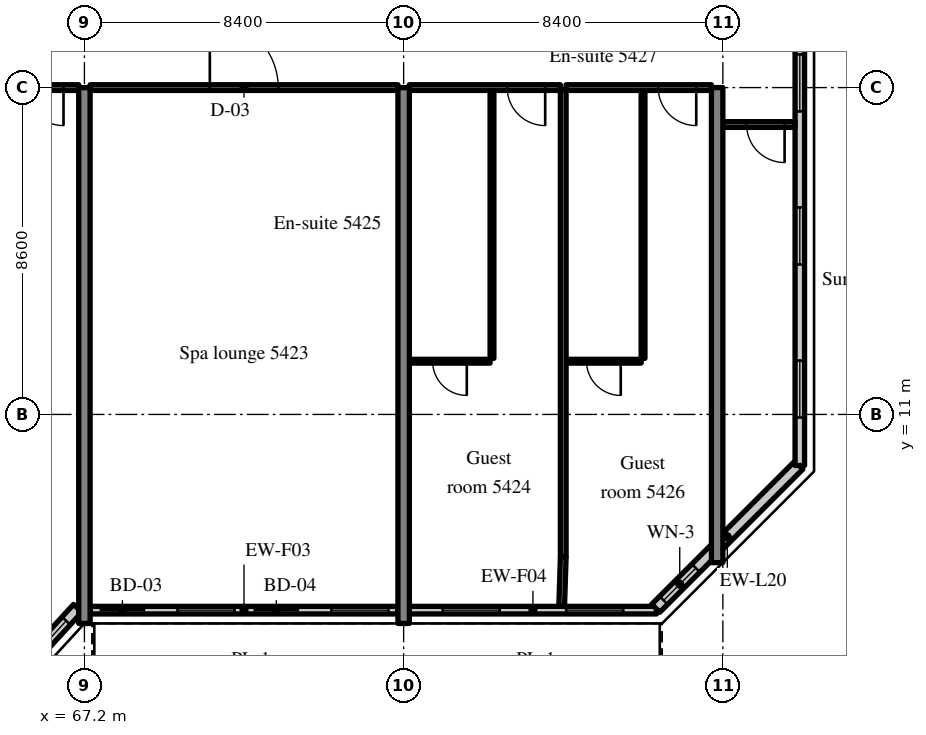
"""IFC4 building model, lengths in metres.
Left out: names, types, materials, properties, quantities, classifications, styles, units other than length and angle.
Written with IfcOpenShell. Run it as: python <this file> out.ifc"""

import sys

from ifc_helpers import new_model, si_unit, direction, frame, frame_2d, origin, place, context, subcontext, project, spatial, rectangle, extrude, source, transform, mapped, element, fill, save


model = new_model("IFC4")
c1 = context("Model", 3, precision=1e-05, world=origin(), true_north=direction((0.0, 1.0)))
c2 = subcontext(c1, "Body", "Model", "MODEL_VIEW")
j1 = project(units=[si_unit("LENGTHUNIT", "METRE"), si_unit("PLANEANGLEUNIT", "RADIAN")], contexts=[c1])
p1 = place(None, origin())
s1 = spatial("IfcSite", under=j1, at=p1, CompositionType="ELEMENT")
p2 = place(p1, origin())
s2 = spatial("IfcBuilding", under=s1, at=p2, CompositionType="ELEMENT")
p3 = place(p2, frame((0.0, 0.0, 225.7)))
s3 = spatial("IfcBuildingStorey", under=s2, at=p3, CompositionType="ELEMENT", Elevation=225.7)
m1 = source(origin(), c2, "Body", "SweptSolid", [
    extrude(rectangle(XDim=14.1, YDim=0.3, at=frame_2d((7.05, 0.0))), origin(), (0.0, 0.0, 1.0), 3.62),
])
for number, where, z_axis, x_axis in (
    (1, (67.2, 5.5, 0.0), (0.0, 0.0, 1.0), (0.0, 1.0, 0.0)),
    (2, (75.6, 5.5, 0.0), (0.0, 0.0, 1.0), (0.0, 1.0, 0.0)),
):
    element("IfcWall", number, at=place(p3, frame(where, z_axis=z_axis, x_axis=x_axis)), inside=s3, PredefinedType="SHEAR", context=c2, shape_type="MappedRepresentation", body=[
        mapped(m1, transform((0.0, 0.0, 0.0), scale=1.0)),
    ])
m2 = source(origin(), c2, "Body", "SweptSolid", [
    extrude(rectangle(XDim=12.5, YDim=0.3, at=frame_2d((6.25, 0.0))), origin(), (0.0, 0.0, 1.0), 3.62),
])
p4 = place(p3, frame((83.85, 7.1, 0.0), z_axis=(0.0, 0.0, 1.0), x_axis=(0.0, 1.0, 0.0)))
e3 = element("IfcWall", 3, at=p4, inside=s3, PredefinedType="SHEAR", context=c2, shape_type="MappedRepresentation", body=[
    mapped(m2, transform((0.0, 0.0, 0.0), scale=1.0)),
])
m3 = source(origin(), c2, "Body", "SweptSolid", [
    extrude(rectangle(XDim=2.398, YDim=0.3, at=frame_2d((1.199, 0.0))), origin(), (0.0, 0.0, 1.0), 3.62),
])
p5 = place(p3, frame((65.404, 4.131, 0.0), z_axis=(0.0, 0.0, 1.0), x_axis=(0.675374189419, 0.737475222815, 0.0)))
e4 = element("IfcWall", 4, at=p5, inside=s3, PredefinedType="SOLIDWALL", context=c2, shape_type="MappedRepresentation", body=[
    mapped(m3, transform((0.0, 0.0, 0.0), scale=1.0)),
])
m4 = source(origin(), c2, "Body", "SweptSolid", [
    extrude(rectangle(XDim=1.5, YDim=2.0, at=frame_2d((0.75, 1.0))), frame((0.0, 0.16, 0.0), z_axis=(0.0, -1.0, 0.0), x_axis=(1.0, 0.0, 0.0)), (0.0, 0.0, 1.0), 0.32),
])
p6 = place(p5, frame((0.449, 0.0, 0.9)))
e5 = element("IfcOpeningElement", 5, at=p6, cuts=e4, PredefinedType="OPENING", context=c2, shape_type="MappedRepresentation", body=[
    mapped(m4, transform((0.0, 0.0, 0.0), scale=1.0)),
])
m5 = source(origin(), c2, "Body", "SweptSolid", [
    extrude(rectangle(XDim=8.1, YDim=0.2, at=frame_2d((4.05, 0.0))), origin(), (0.0, 0.0, 1.0), 3.02),
])
p7 = place(p3, frame((67.35, 5.85, 0.0), z_axis=(0.0, 0.0, 1.0), x_axis=(1.0, 0.0, 0.0)))
e6 = element("IfcWall", 6, at=p7, inside=s3, PredefinedType="SOLIDWALL", context=c2, shape_type="MappedRepresentation", body=[
    mapped(m5, transform((0.0, 0.0, 0.0), scale=1.0)),
])
m6 = source(origin(), c2, "Body", "SweptSolid", [
    extrude(rectangle(XDim=1.2, YDim=2.4, at=frame_2d((0.6, 1.2))), frame((0.0, 0.11, 0.0), z_axis=(0.0, -1.0, 0.0), x_axis=(1.0, 0.0, 0.0)), (0.0, 0.0, 1.0), 0.22),
])
p8 = place(p7, frame((0.25, 0.0, 0.0)))
e7 = element("IfcOpeningElement", 7, at=p8, cuts=e6, PredefinedType="OPENING", context=c2, shape_type="MappedRepresentation", body=[
    mapped(m6, transform((0.0, 0.0, 0.0), scale=1.0)),
])
m7 = source(origin(), c2, "Body", "SweptSolid", [
    extrude(rectangle(XDim=1.5, YDim=1.5, at=frame_2d((0.75, 0.75))), frame((0.0, 0.11, 0.0), z_axis=(0.0, -1.0, 0.0), x_axis=(1.0, 0.0, 0.0)), (0.0, 0.0, 1.0), 0.22),
])
p9 = place(p7, frame((2.3, 0.0, 0.9)))
e8 = element("IfcOpeningElement", 8, at=p9, cuts=e6, PredefinedType="OPENING", context=c2, shape_type="MappedRepresentation", body=[
    mapped(m7, transform((0.0, 0.0, 0.0), scale=1.0)),
])
p10 = place(p7, frame((4.3, 0.0, 0.0)))
e9 = element("IfcOpeningElement", 9, at=p10, cuts=e6, PredefinedType="OPENING", context=c2, shape_type="MappedRepresentation", body=[
    mapped(m6, transform((0.0, 0.0, 0.0), scale=1.0)),
])
p11 = place(p7, frame((6.35, 0.0, 0.9)))
e10 = element("IfcOpeningElement", 10, at=p11, cuts=e6, PredefinedType="OPENING", context=c2, shape_type="MappedRepresentation", body=[
    mapped(m7, transform((0.0, 0.0, 0.0), scale=1.0)),
])
m8 = source(origin(), c2, "Body", "SweptSolid", [
    extrude(rectangle(XDim=6.505, YDim=0.2, at=frame_2d((3.252, 0.0))), origin(), (0.0, 0.0, 1.0), 3.02),
])
p12 = place(p3, frame((75.75, 5.85, 0.0), z_axis=(0.0, 0.0, 1.0), x_axis=(1.0, 0.0, 0.0)))
e11 = element("IfcWall", 11, at=p12, inside=s3, PredefinedType="SOLIDWALL", context=c2, shape_type="MappedRepresentation", body=[
    mapped(m8, transform((0.0, 0.0, 0.0), scale=1.0)),
])
p13 = place(p12, frame((0.876, 0.0, 0.9)))
e12 = element("IfcOpeningElement", 12, at=p13, cuts=e11, PredefinedType="OPENING", context=c2, shape_type="MappedRepresentation", body=[
    mapped(m7, transform((0.0, 0.0, 0.0), scale=1.0)),
])
p14 = place(p12, frame((4.129, 0.0, 0.9)))
e13 = element("IfcOpeningElement", 13, at=p14, cuts=e11, PredefinedType="OPENING", context=c2, shape_type="MappedRepresentation", body=[
    mapped(m7, transform((0.0, 0.0, 0.0), scale=1.0)),
])
m9 = source(origin(), c2, "Body", "SweptSolid", [
    extrude(rectangle(XDim=5.326, YDim=0.3, at=frame_2d((2.663, 0.0))), origin(), (0.0, 0.0, 1.0), 3.62),
])
p15 = place(p3, frame((82.234, 5.9, 0.0), z_axis=(0.0, 0.0, 1.0), x_axis=(0.707083859269, 0.707129702361, 0.0)))
e14 = element("IfcWall", 14, at=p15, inside=s3, PredefinedType="SOLIDWALL", context=c2, shape_type="MappedRepresentation", body=[
    mapped(m9, transform((0.0, 0.0, 0.0), scale=1.0)),
])
m10 = source(origin(), c2, "Body", "SweptSolid", [
    extrude(rectangle(XDim=1.2, YDim=1.5, at=frame_2d((0.6, 0.75))), frame((0.0, 0.16, 0.0), z_axis=(0.0, -1.0, 0.0), x_axis=(1.0, 0.0, 0.0)), (0.0, 0.0, 1.0), 0.32),
])
p16 = place(p15, frame((0.292, 0.0, 0.9)))
e15 = element("IfcOpeningElement", 15, at=p16, cuts=e14, PredefinedType="OPENING", context=c2, shape_type="MappedRepresentation", body=[
    mapped(m10, transform((0.0, 0.0, 0.0), scale=1.0)),
])
m11 = source(origin(), c2, "Body", "SweptSolid", [
    extrude(rectangle(XDim=28.189, YDim=0.25, at=frame_2d((14.095, 0.0))), origin(), (0.0, 0.0, 1.0), 3.62),
])
p17 = place(p3, frame((86.025, 9.655, 0.0), z_axis=(0.0, 0.0, 1.0), x_axis=(0.0, 1.0, 0.0)))
e16 = element("IfcWall", 16, at=p17, inside=s3, PredefinedType="SOLIDWALL", context=c2, shape_type="MappedRepresentation", body=[
    mapped(m11, transform((0.0, 0.0, 0.0), scale=1.0)),
])
m12 = source(origin(), c2, "Body", "SweptSolid", [
    extrude(rectangle(XDim=1.5, YDim=1.5, at=frame_2d((0.75, 0.75))), frame((0.0, 0.135, 0.0), z_axis=(0.0, -1.0, 0.0), x_axis=(1.0, 0.0, 0.0)), (0.0, 0.0, 1.0), 0.27),
])
p18 = place(p17, frame((1.263, 0.0, 0.9)))
e17 = element("IfcOpeningElement", 17, at=p18, cuts=e16, PredefinedType="OPENING", context=c2, shape_type="MappedRepresentation", body=[
    mapped(m12, transform((0.0, 0.0, 0.0), scale=1.0)),
])
p19 = place(p17, frame((5.291, 0.0, 0.9)))
e18 = element("IfcOpeningElement", 18, at=p19, cuts=e16, PredefinedType="OPENING", context=c2, shape_type="MappedRepresentation", body=[
    mapped(m12, transform((0.0, 0.0, 0.0), scale=1.0)),
])
p20 = place(p17, frame((9.318, 0.0, 0.9)))
e19 = element("IfcOpeningElement", 19, at=p20, cuts=e16, PredefinedType="OPENING", context=c2, shape_type="MappedRepresentation", body=[
    mapped(m12, transform((0.0, 0.0, 0.0), scale=1.0)),
])
p21 = place(p17, frame((13.345, 0.0, 0.9)))
e20 = element("IfcOpeningElement", 20, at=p21, cuts=e16, PredefinedType="OPENING", context=c2, shape_type="MappedRepresentation", body=[
    mapped(m12, transform((0.0, 0.0, 0.0), scale=1.0)),
])
p22 = place(p17, frame((17.372, 0.0, 0.9)))
e21 = element("IfcOpeningElement", 21, at=p22, cuts=e16, PredefinedType="OPENING", context=c2, shape_type="MappedRepresentation", body=[
    mapped(m12, transform((0.0, 0.0, 0.0), scale=1.0)),
])
p23 = place(p17, frame((21.399, 0.0, 0.9)))
e22 = element("IfcOpeningElement", 22, at=p23, cuts=e16, PredefinedType="OPENING", context=c2, shape_type="MappedRepresentation", body=[
    mapped(m12, transform((0.0, 0.0, 0.0), scale=1.0)),
])
p24 = place(p17, frame((25.426, 0.0, 0.9)))
e23 = element("IfcOpeningElement", 23, at=p24, cuts=e16, PredefinedType="OPENING", context=c2, shape_type="MappedRepresentation", body=[
    mapped(m12, transform((0.0, 0.0, 0.0), scale=1.0)),
])
m13 = source(origin(), c2, "Body", "SweptSolid", [
    extrude(rectangle(XDim=8.1, YDim=0.15, at=frame_2d((4.05, 0.0))), origin(), (0.0, 0.0, 1.0), 2.92),
])
p25 = place(p3, frame((58.95, 19.6, 0.0), z_axis=(0.0, 0.0, 1.0), x_axis=(1.0, 0.0, 0.0)))
e24 = element("IfcWall", 24, at=p25, inside=s3, PredefinedType="PARTITIONING", context=c2, shape_type="MappedRepresentation", body=[
    mapped(m13, transform((0.0, 0.0, 0.0), scale=1.0)),
])
m14 = source(origin(), c2, "Body", "SweptSolid", [
    extrude(rectangle(XDim=1.0, YDim=2.1, at=frame_2d((0.5, 1.05))), frame((0.0, 0.085, 0.0), z_axis=(0.0, -1.0, 0.0), x_axis=(1.0, 0.0, 0.0)), (0.0, 0.0, 1.0), 0.17),
])
p26 = place(p25, frame((6.7, 0.0, 0.0)))
e25 = element("IfcOpeningElement", 25, at=p26, cuts=e24, PredefinedType="OPENING", context=c2, shape_type="MappedRepresentation", body=[
    mapped(m14, transform((0.0, 0.0, 0.0), scale=1.0)),
])
m15 = source(origin(), c2, "Body", "SweptSolid", [
    extrude(rectangle(XDim=8.1, YDim=0.15, at=frame_2d((4.05, 0.0))), origin(), (0.0, 0.0, 1.0), 2.92),
])
p27 = place(p3, frame((67.35, 19.6, 0.0), z_axis=(0.0, 0.0, 1.0), x_axis=(1.0, 0.0, 0.0)))
e26 = element("IfcWall", 26, at=p27, inside=s3, PredefinedType="PARTITIONING", context=c2, shape_type="MappedRepresentation", body=[
    mapped(m15, transform((0.0, 0.0, 0.0), scale=1.0)),
])
m16 = source(origin(), c2, "Body", "SweptSolid", [
    extrude(rectangle(XDim=1.8, YDim=2.1, at=frame_2d((0.9, 1.05))), frame((0.0, 0.085, 0.0), z_axis=(0.0, -1.0, 0.0), x_axis=(1.0, 0.0, 0.0)), (0.0, 0.0, 1.0), 0.17),
])
p28 = place(p27, frame((3.15, 0.0, 0.0)))
e27 = element("IfcOpeningElement", 27, at=p28, cuts=e26, PredefinedType="OPENING", context=c2, shape_type="MappedRepresentation", body=[
    mapped(m16, transform((0.0, 0.0, 0.0), scale=1.0)),
])
m17 = source(origin(), c2, "Body", "SweptSolid", [
    extrude(rectangle(XDim=7.05, YDim=0.1, at=frame_2d((3.525, 0.0))), origin(), (0.0, 0.0, 1.0), 3.62),
])
p29 = place(p3, frame((77.925, 12.475, 0.0), z_axis=(0.0, 0.0, 1.0), x_axis=(0.0, 1.0, 0.0)))
e28 = element("IfcWall", 28, at=p29, inside=s3, PredefinedType="PARTITIONING", context=c2, shape_type="MappedRepresentation", body=[
    mapped(m17, transform((0.0, 0.0, 0.0), scale=1.0)),
])
m18 = source(origin(), c2, "Body", "SweptSolid", [
    extrude(rectangle(XDim=2.125, YDim=0.1, at=frame_2d((1.062, 0.0))), origin(), (0.0, 0.0, 1.0), 3.62),
])
p30 = place(p3, frame((75.75, 12.4, 0.0), z_axis=(0.0, 0.0, 1.0), x_axis=(1.0, 0.0, 0.0)))
e29 = element("IfcWall", 29, at=p30, inside=s3, PredefinedType="PARTITIONING", context=c2, shape_type="MappedRepresentation", body=[
    mapped(m18, transform((0.0, 0.0, 0.0), scale=1.0)),
])
m19 = source(origin(), c2, "Body", "SweptSolid", [
    extrude(rectangle(XDim=0.9, YDim=2.1, at=frame_2d((0.45, 1.05))), frame((0.0, 0.06, 0.0), z_axis=(0.0, -1.0, 0.0), x_axis=(1.0, 0.0, 0.0)), (0.0, 0.0, 1.0), 0.12),
])
p31 = place(p30, frame((0.612, 0.0, 0.0)))
e30 = element("IfcOpeningElement", 30, at=p31, cuts=e29, PredefinedType="OPENING", context=c2, shape_type="MappedRepresentation", body=[
    mapped(m19, transform((0.0, 0.0, 0.0), scale=1.0)),
])
m20 = source(origin(), c2, "Body", "SweptSolid", [
    extrude(rectangle(XDim=3.975, YDim=0.15, at=frame_2d((1.988, 0.0))), origin(), (0.0, 0.0, 1.0), 2.92),
])
p32 = place(p3, frame((75.75, 19.6, 0.0), z_axis=(0.0, 0.0, 1.0), x_axis=(1.0, 0.0, 0.0)))
e31 = element("IfcWall", 31, at=p32, inside=s3, PredefinedType="PARTITIONING", context=c2, shape_type="MappedRepresentation", body=[
    mapped(m20, transform((0.0, 0.0, 0.0), scale=1.0)),
])
p33 = place(p32, frame((2.575, 0.0, 0.0)))
e32 = element("IfcOpeningElement", 32, at=p33, cuts=e31, PredefinedType="OPENING", context=c2, shape_type="MappedRepresentation", body=[
    mapped(m14, transform((0.0, 0.0, 0.0), scale=1.0)),
])
p34 = place(p3, frame((81.9, 12.475, 0.0), z_axis=(0.0, 0.0, 1.0), x_axis=(0.0, 1.0, 0.0)))
e33 = element("IfcWall", 33, at=p34, inside=s3, PredefinedType="PARTITIONING", context=c2, shape_type="MappedRepresentation", body=[
    mapped(m17, transform((0.0, 0.0, 0.0), scale=1.0)),
])
m21 = source(origin(), c2, "Body", "SweptSolid", [
    extrude(rectangle(XDim=1.975, YDim=0.1, at=frame_2d((0.988, 0.0))), origin(), (0.0, 0.0, 1.0), 3.62),
])
p35 = place(p3, frame((79.875, 12.4, 0.0), z_axis=(0.0, 0.0, 1.0), x_axis=(1.0, 0.0, 0.0)))
e34 = element("IfcWall", 34, at=p35, inside=s3, PredefinedType="PARTITIONING", context=c2, shape_type="MappedRepresentation", body=[
    mapped(m21, transform((0.0, 0.0, 0.0), scale=1.0)),
])
p36 = place(p35, frame((0.538, 0.0, 0.0)))
e35 = element("IfcOpeningElement", 35, at=p36, cuts=e34, PredefinedType="OPENING", context=c2, shape_type="MappedRepresentation", body=[
    mapped(m19, transform((0.0, 0.0, 0.0), scale=1.0)),
])
m22 = source(origin(), c2, "Body", "SweptSolid", [
    extrude(rectangle(XDim=3.825, YDim=0.15, at=frame_2d((1.913, 0.0))), origin(), (0.0, 0.0, 1.0), 2.92),
])
p37 = place(p3, frame((79.875, 19.6, 0.0), z_axis=(0.0, 0.0, 1.0), x_axis=(1.0, 0.0, 0.0)))
e36 = element("IfcWall", 36, at=p37, inside=s3, PredefinedType="PARTITIONING", context=c2, shape_type="MappedRepresentation", body=[
    mapped(m22, transform((0.0, 0.0, 0.0), scale=1.0)),
])
p38 = place(p37, frame((2.425, 0.0, 0.0)))
e37 = element("IfcOpeningElement", 37, at=p38, cuts=e36, PredefinedType="OPENING", context=c2, shape_type="MappedRepresentation", body=[
    mapped(m14, transform((0.0, 0.0, 0.0), scale=1.0)),
])
m23 = source(origin(), c2, "Body", "SweptSolid", [
    extrude(rectangle(XDim=12.275, YDim=0.15, at=frame_2d((6.137, 0.0))), origin(), (0.0, 0.0, 1.0), 3.62),
])
p39 = place(p3, frame((79.8, 7.25, 0.0), z_axis=(0.0, 0.0, 1.0), x_axis=(0.0, 1.0, 0.0)))
e38 = element("IfcWall", 38, at=p39, inside=s3, PredefinedType="PARTITIONING", context=c2, shape_type="MappedRepresentation", body=[
    mapped(m23, transform((0.0, 0.0, 0.0), scale=1.0)),
])
m24 = source(origin(), c2, "Body", "SweptSolid", [
    extrude(rectangle(XDim=1.9, YDim=0.15, at=frame_2d((0.95, 0.0))), origin(), (0.0, 0.0, 1.0), 2.92),
])
p40 = place(p3, frame((84.0, 18.628, 0.0), z_axis=(0.0, 0.0, 1.0), x_axis=(1.0, 0.0, 0.0)))
e39 = element("IfcWall", 39, at=p40, inside=s3, PredefinedType="PARTITIONING", context=c2, shape_type="MappedRepresentation", body=[
    mapped(m24, transform((0.0, 0.0, 0.0), scale=1.0)),
])
p41 = place(p40, frame((0.625, 0.0, 0.0)))
e40 = element("IfcOpeningElement", 40, at=p41, cuts=e39, PredefinedType="OPENING", context=c2, shape_type="MappedRepresentation", body=[
    mapped(m14, transform((0.0, 0.0, 0.0), scale=1.0)),
])
m25 = source(origin(), c2, "Body", "SweptSolid", [
    extrude(rectangle(XDim=1.301, YDim=0.15, at=frame_2d((0.65, 0.0))), origin(), (0.0, 0.0, 1.0), 3.62),
])
p42 = place(p3, frame((79.759, 5.95, 0.0), z_axis=(0.0, 0.0, 1.0), x_axis=(0.031533606063, 0.999502692187, 0.0)))
e41 = element("IfcWall", 41, at=p42, inside=s3, PredefinedType="PARTITIONING", context=c2, shape_type="MappedRepresentation", body=[
    mapped(m25, transform((0.0, 0.0, 0.0), scale=1.0)),
])
m26 = source(origin(), c2, "Body", "SweptSolid", [
    extrude(rectangle(XDim=1.5, YDim=2.0, at=frame_2d((0.75, 1.0))), frame((0.0, 0.03, 0.0), z_axis=(0.0, -1.0, 0.0), x_axis=(1.0, 0.0, 0.0)), (0.0, 0.0, 1.0), 0.06),
])
p43 = place(p6, origin())
e42 = element("IfcWindow", 42, at=p43, inside=s3, PartitioningType="SINGLE_PANEL", PredefinedType="WINDOW", context=c2, shape_type="MappedRepresentation", body=[
    mapped(m26, transform((0.0, 0.0, 0.0), scale=1.0)),
])
fill(e5, e42)
m27 = source(origin(), c2, "Body", "SweptSolid", [
    extrude(rectangle(XDim=1.2, YDim=2.4, at=frame_2d((0.6, 1.2))), frame((0.0, 0.025, 0.0), z_axis=(0.0, -1.0, 0.0), x_axis=(1.0, 0.0, 0.0)), (0.0, 0.0, 1.0), 0.05),
])
p44 = place(p8, origin())
e43 = element("IfcDoor", 43, at=p44, inside=s3, OperationType="SLIDING_TO_LEFT", PredefinedType="DOOR", context=c2, shape_type="MappedRepresentation", body=[
    mapped(m27, transform((0.0, 0.0, 0.0), scale=1.0)),
])
fill(e7, e43)
m28 = source(origin(), c2, "Body", "SweptSolid", [
    extrude(rectangle(XDim=1.5, YDim=1.5, at=frame_2d((0.75, 0.75))), frame((0.0, 0.03, 0.0), z_axis=(0.0, -1.0, 0.0), x_axis=(1.0, 0.0, 0.0)), (0.0, 0.0, 1.0), 0.06),
])
p45 = place(p9, origin())
e44 = element("IfcWindow", 44, at=p45, inside=s3, PartitioningType="SINGLE_PANEL", PredefinedType="WINDOW", context=c2, shape_type="MappedRepresentation", body=[
    mapped(m28, transform((0.0, 0.0, 0.0), scale=1.0)),
])
fill(e8, e44)
p46 = place(p10, origin())
e45 = element("IfcDoor", 45, at=p46, inside=s3, OperationType="SLIDING_TO_RIGHT", PredefinedType="DOOR", context=c2, shape_type="MappedRepresentation", body=[
    mapped(m27, transform((0.0, 0.0, 0.0), scale=1.0)),
])
fill(e9, e45)
p47 = place(p11, origin())
e46 = element("IfcWindow", 46, at=p47, inside=s3, PartitioningType="SINGLE_PANEL", PredefinedType="WINDOW", context=c2, shape_type="MappedRepresentation", body=[
    mapped(m28, transform((0.0, 0.0, 0.0), scale=1.0)),
])
fill(e10, e46)
p48 = place(p13, origin())
e47 = element("IfcWindow", 47, at=p48, inside=s3, PartitioningType="SINGLE_PANEL", PredefinedType="WINDOW", context=c2, shape_type="MappedRepresentation", body=[
    mapped(m28, transform((0.0, 0.0, 0.0), scale=1.0)),
])
fill(e12, e47)
p49 = place(p14, origin())
e48 = element("IfcWindow", 48, at=p49, inside=s3, PartitioningType="SINGLE_PANEL", PredefinedType="WINDOW", context=c2, shape_type="MappedRepresentation", body=[
    mapped(m28, transform((0.0, 0.0, 0.0), scale=1.0)),
])
fill(e13, e48)
m29 = source(origin(), c2, "Body", "SweptSolid", [
    extrude(rectangle(XDim=1.2, YDim=1.5, at=frame_2d((0.6, 0.75))), frame((0.0, 0.03, 0.0), z_axis=(0.0, -1.0, 0.0), x_axis=(1.0, 0.0, 0.0)), (0.0, 0.0, 1.0), 0.06),
])
p50 = place(p16, origin())
e49 = element("IfcWindow", 49, at=p50, inside=s3, PartitioningType="SINGLE_PANEL", PredefinedType="WINDOW", context=c2, shape_type="MappedRepresentation", body=[
    mapped(m29, transform((0.0, 0.0, 0.0), scale=1.0)),
])
fill(e15, e49)
p51 = place(p18, origin())
e50 = element("IfcWindow", 50, at=p51, inside=s3, PartitioningType="SINGLE_PANEL", PredefinedType="WINDOW", context=c2, shape_type="MappedRepresentation", body=[
    mapped(m28, transform((0.0, 0.0, 0.0), scale=1.0)),
])
fill(e17, e50)
p52 = place(p19, origin())
e51 = element("IfcWindow", 51, at=p52, inside=s3, PartitioningType="SINGLE_PANEL", PredefinedType="WINDOW", context=c2, shape_type="MappedRepresentation", body=[
    mapped(m28, transform((0.0, 0.0, 0.0), scale=1.0)),
])
fill(e18, e51)
p53 = place(p20, origin())
e52 = element("IfcWindow", 52, at=p53, inside=s3, PartitioningType="SINGLE_PANEL", PredefinedType="WINDOW", context=c2, shape_type="MappedRepresentation", body=[
    mapped(m28, transform((0.0, 0.0, 0.0), scale=1.0)),
])
fill(e19, e52)
m30 = source(origin(), c2, "Body", "SweptSolid", [
    extrude(rectangle(XDim=1.0, YDim=2.1, at=frame_2d((0.5, 1.05))), frame((0.0, 0.025, 0.0), z_axis=(0.0, -1.0, 0.0), x_axis=(1.0, 0.0, 0.0)), (0.0, 0.0, 1.0), 0.05),
])
p54 = place(p26, origin())
e53 = element("IfcDoor", 53, at=p54, inside=s3, OperationType="SINGLE_SWING_RIGHT", PredefinedType="DOOR", context=c2, shape_type="MappedRepresentation", body=[
    mapped(m30, transform((0.0, 0.0, 0.0), scale=1.0)),
])
fill(e25, e53)
m31 = source(origin(), c2, "Body", "SweptSolid", [
    extrude(rectangle(XDim=1.8, YDim=2.1, at=frame_2d((0.9, 1.05))), frame((0.0, 0.025, 0.0), z_axis=(0.0, -1.0, 0.0), x_axis=(1.0, 0.0, 0.0)), (0.0, 0.0, 1.0), 0.05),
])
p55 = place(p28, origin())
e54 = element("IfcDoor", 54, at=p55, inside=s3, OperationType="DOUBLE_DOOR_SINGLE_SWING", PredefinedType="DOOR", context=c2, shape_type="MappedRepresentation", body=[
    mapped(m31, transform((0.0, 0.0, 0.0), scale=1.0)),
])
fill(e27, e54)
m32 = source(origin(), c2, "Body", "SweptSolid", [
    extrude(rectangle(XDim=0.9, YDim=2.1, at=frame_2d((0.45, 1.05))), frame((0.0, 0.025, 0.0), z_axis=(0.0, -1.0, 0.0), x_axis=(1.0, 0.0, 0.0)), (0.0, 0.0, 1.0), 0.05),
])
p56 = place(p31, origin())
e55 = element("IfcDoor", 55, at=p56, inside=s3, OperationType="SINGLE_SWING_RIGHT", PredefinedType="DOOR", context=c2, shape_type="MappedRepresentation", body=[
    mapped(m32, transform((0.0, 0.0, 0.0), scale=1.0)),
])
fill(e30, e55)
p57 = place(p33, origin())
e56 = element("IfcDoor", 56, at=p57, inside=s3, OperationType="SINGLE_SWING_RIGHT", PredefinedType="DOOR", context=c2, shape_type="MappedRepresentation", body=[
    mapped(m30, transform((0.0, 0.0, 0.0), scale=1.0)),
])
fill(e32, e56)
p58 = place(p36, origin())
e57 = element("IfcDoor", 57, at=p58, inside=s3, OperationType="SINGLE_SWING_RIGHT", PredefinedType="DOOR", context=c2, shape_type="MappedRepresentation", body=[
    mapped(m32, transform((0.0, 0.0, 0.0), scale=1.0)),
])
fill(e35, e57)
p59 = place(p38, origin())
e58 = element("IfcDoor", 58, at=p59, inside=s3, OperationType="SINGLE_SWING_RIGHT", PredefinedType="DOOR", context=c2, shape_type="MappedRepresentation", body=[
    mapped(m30, transform((0.0, 0.0, 0.0), scale=1.0)),
])
fill(e37, e58)
p60 = place(p41, origin())
e59 = element("IfcDoor", 59, at=p60, inside=s3, OperationType="SINGLE_SWING_RIGHT", PredefinedType="DOOR", context=c2, shape_type="MappedRepresentation", body=[
    mapped(m30, transform((0.0, 0.0, 0.0), scale=1.0)),
])
fill(e40, e59)
save(model, sys.argv[1])
